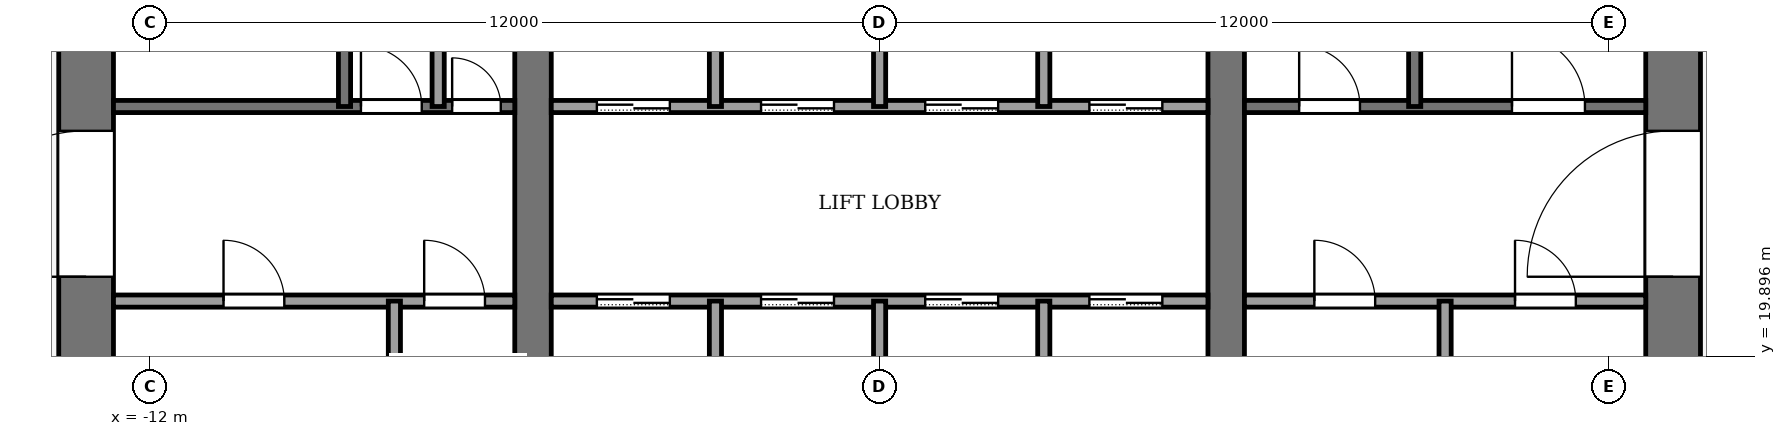
"""IFC4 building model, lengths in metres.
Left out: names, types, materials, properties, quantities, classifications, styles, units other than length and angle.
Written with IfcOpenShell. Run it as: python <this file> out.ifc"""

import sys

from ifc_helpers import new_model, si_unit, direction, frame, frame_2d, origin, place, context, subcontext, project, spatial, rectangle, extrude, element, fill, save


model = new_model("IFC4")
c1 = context("Model", 3, precision=1e-05, world=origin(), true_north=direction((0.0, 1.0)))
c2 = subcontext(c1, "Body", "Model", "MODEL_VIEW")
j1 = project(units=[si_unit("LENGTHUNIT", "METRE"), si_unit("PLANEANGLEUNIT", "RADIAN")], contexts=[c1])
p1 = place(None, origin())
s1 = spatial("IfcSite", under=j1, at=p1, CompositionType="ELEMENT")
p2 = place(p1, origin())
s2 = spatial("IfcBuilding", under=s1, at=p2, CompositionType="ELEMENT")
p3 = place(p2, frame((0.0, 0.0, 190.0)))
s3 = spatial("IfcBuildingStorey", under=s2, at=p3, CompositionType="ELEMENT", Elevation=190.0)
p4 = place(p3, frame((-13.05, 18.4, -0.13), z_axis=(0.0, 0.0, 1.0), x_axis=(0.0, 1.0, 0.0)))
e1 = element("IfcWall", 1, at=p4, inside=s3, PredefinedType="SHEAR", context=c2, shape_type="SweptSolid", body=[
    extrude(rectangle(XDim=19.2, YDim=0.9, at=frame_2d((9.6, 0.0))), origin(), (0.0, 0.0, 1.0), 4.0),
])
p5 = place(p4, frame((2.8, 0.0, 0.13)))
e2 = element("IfcOpeningElement", 2, at=p5, cuts=e1, PredefinedType="OPENING", context=c2, shape_type="SweptSolid", body=[
    extrude(rectangle(XDim=2.4, YDim=2.4, at=frame_2d((1.2, 1.2))), frame((0.0, 0.46, 0.0), z_axis=(0.0, -1.0, 0.0), x_axis=(1.0, 0.0, 0.0)), (0.0, 0.0, 1.0), 0.92),
])
p6 = place(p4, frame((13.4, 0.0, 0.13)))
e3 = element("IfcOpeningElement", 3, at=p6, cuts=e1, PredefinedType="OPENING", context=c2, shape_type="SweptSolid", body=[
    extrude(rectangle(XDim=1.4, YDim=2.2, at=frame_2d((0.7, 1.1))), frame((0.0, 0.46, 0.0), z_axis=(0.0, -1.0, 0.0), x_axis=(1.0, 0.0, 0.0)), (0.0, 0.0, 1.0), 0.92),
])
p7 = place(p3, frame((13.05, 18.4, -0.13), z_axis=(0.0, 0.0, 1.0), x_axis=(0.0, 1.0, 0.0)))
e4 = element("IfcWall", 4, at=p7, inside=s3, PredefinedType="SHEAR", context=c2, shape_type="SweptSolid", body=[
    extrude(rectangle(XDim=19.2, YDim=0.9, at=frame_2d((9.6, 0.0))), origin(), (0.0, 0.0, 1.0), 4.0),
])
p8 = place(p7, frame((2.8, 0.0, 0.13)))
e5 = element("IfcOpeningElement", 5, at=p8, cuts=e4, PredefinedType="OPENING", context=c2, shape_type="SweptSolid", body=[
    extrude(rectangle(XDim=2.4, YDim=2.4, at=frame_2d((1.2, 1.2))), frame((0.0, 0.46, 0.0), z_axis=(0.0, -1.0, 0.0), x_axis=(1.0, 0.0, 0.0)), (0.0, 0.0, 1.0), 0.92),
])
p9 = place(p7, frame((13.3, 0.0, 0.13)))
e6 = element("IfcOpeningElement", 6, at=p9, cuts=e4, PredefinedType="OPENING", context=c2, shape_type="SweptSolid", body=[
    extrude(rectangle(XDim=2.4, YDim=2.4, at=frame_2d((1.2, 1.2))), frame((0.0, 0.46, 0.0), z_axis=(0.0, -1.0, 0.0), x_axis=(1.0, 0.0, 0.0)), (0.0, 0.0, 1.0), 0.92),
])
p10 = place(p3, frame((-5.7, 18.4, -0.13), z_axis=(0.0, 0.0, 1.0), x_axis=(0.0, 1.0, 0.0)))
e7 = element("IfcWall", 7, at=p10, inside=s3, PredefinedType="SHEAR", context=c2, shape_type="SweptSolid", body=[
    extrude(rectangle(XDim=19.2, YDim=0.6, at=frame_2d((9.6, 0.0))), origin(), (0.0, 0.0, 1.0), 4.0),
])
p11 = place(p10, frame((8.35, 0.0, 0.13)))
e8 = element("IfcOpeningElement", 8, at=p11, cuts=e7, PredefinedType="OPENING", context=c2, shape_type="SweptSolid", body=[
    extrude(rectangle(XDim=0.9, YDim=2.1, at=frame_2d((0.45, 1.05))), frame((0.0, 0.31, 0.0), z_axis=(0.0, -1.0, 0.0), x_axis=(1.0, 0.0, 0.0)), (0.0, 0.0, 1.0), 0.62),
])
p12 = place(p3, frame((5.7, 18.4, -0.13), z_axis=(0.0, 0.0, 1.0), x_axis=(0.0, 1.0, 0.0)))
e9 = element("IfcWall", 9, at=p12, inside=s3, PredefinedType="SHEAR", context=c2, shape_type="SweptSolid", body=[
    extrude(rectangle(XDim=19.2, YDim=0.6, at=frame_2d((9.6, 0.0))), origin(), (0.0, 0.0, 1.0), 4.0),
])
p13 = place(p12, frame((8.35, 0.0, 0.13)))
e10 = element("IfcOpeningElement", 10, at=p13, cuts=e9, PredefinedType="OPENING", context=c2, shape_type="SweptSolid", body=[
    extrude(rectangle(XDim=0.9, YDim=2.1, at=frame_2d((0.45, 1.05))), frame((0.0, 0.31, 0.0), z_axis=(0.0, -1.0, 0.0), x_axis=(1.0, 0.0, 0.0)), (0.0, 0.0, 1.0), 0.62),
])
p14 = place(p12, frame((13.3, 0.0, 0.13)))
e11 = element("IfcOpeningElement", 11, at=p14, cuts=e9, PredefinedType="OPENING", context=c2, shape_type="SweptSolid", body=[
    extrude(rectangle(XDim=2.4, YDim=2.4, at=frame_2d((1.2, 1.2))), frame((0.0, 0.31, 0.0), z_axis=(0.0, -1.0, 0.0), x_axis=(1.0, 0.0, 0.0)), (0.0, 0.0, 1.0), 0.62),
])
p15 = place(p3, frame((-12.6, 20.8, 0.0), z_axis=(0.0, 0.0, 1.0), x_axis=(1.0, 0.0, 0.0)))
e12 = element("IfcWall", 12, at=p15, inside=s3, PredefinedType="PARTITIONING", context=c2, shape_type="SweptSolid", body=[
    extrude(rectangle(XDim=6.6, YDim=0.2, at=frame_2d((3.3, 0.0))), origin(), (0.0, 0.0, 1.0), 3.87),
])
p16 = place(p15, frame((1.81, 0.0, 0.0)))
e13 = element("IfcOpeningElement", 13, at=p16, cuts=e12, PredefinedType="OPENING", context=c2, shape_type="SweptSolid", body=[
    extrude(rectangle(XDim=1.0, YDim=2.1, at=frame_2d((0.5, 1.05))), frame((0.0, 0.11, 0.0), z_axis=(0.0, -1.0, 0.0), x_axis=(1.0, 0.0, 0.0)), (0.0, 0.0, 1.0), 0.22),
])
p17 = place(p15, frame((5.11, 0.0, 0.0)))
e14 = element("IfcOpeningElement", 14, at=p17, cuts=e12, PredefinedType="OPENING", context=c2, shape_type="SweptSolid", body=[
    extrude(rectangle(XDim=1.0, YDim=2.1, at=frame_2d((0.5, 1.05))), frame((0.0, 0.11, 0.0), z_axis=(0.0, -1.0, 0.0), x_axis=(1.0, 0.0, 0.0)), (0.0, 0.0, 1.0), 0.22),
])
p18 = place(p3, frame((-5.4, 20.8, 0.0), z_axis=(0.0, 0.0, 1.0), x_axis=(1.0, 0.0, 0.0)))
e15 = element("IfcWall", 15, at=p18, inside=s3, PredefinedType="PARTITIONING", context=c2, shape_type="SweptSolid", body=[
    extrude(rectangle(XDim=10.8, YDim=0.2, at=frame_2d((5.4, 0.0))), origin(), (0.0, 0.0, 1.0), 3.87),
])
p19 = place(p18, frame((0.75, 0.0, 0.0)))
e16 = element("IfcOpeningElement", 16, at=p19, cuts=e15, PredefinedType="OPENING", context=c2, shape_type="SweptSolid", body=[
    extrude(rectangle(XDim=1.2, YDim=2.2, at=frame_2d((0.6, 1.1))), frame((0.0, 0.11, 0.0), z_axis=(0.0, -1.0, 0.0), x_axis=(1.0, 0.0, 0.0)), (0.0, 0.0, 1.0), 0.22),
])
p20 = place(p18, frame((3.45, 0.0, 0.0)))
e17 = element("IfcOpeningElement", 17, at=p20, cuts=e15, PredefinedType="OPENING", context=c2, shape_type="SweptSolid", body=[
    extrude(rectangle(XDim=1.2, YDim=2.2, at=frame_2d((0.6, 1.1))), frame((0.0, 0.11, 0.0), z_axis=(0.0, -1.0, 0.0), x_axis=(1.0, 0.0, 0.0)), (0.0, 0.0, 1.0), 0.22),
])
p21 = place(p18, frame((6.15, 0.0, 0.0)))
e18 = element("IfcOpeningElement", 18, at=p21, cuts=e15, PredefinedType="OPENING", context=c2, shape_type="SweptSolid", body=[
    extrude(rectangle(XDim=1.2, YDim=2.2, at=frame_2d((0.6, 1.1))), frame((0.0, 0.11, 0.0), z_axis=(0.0, -1.0, 0.0), x_axis=(1.0, 0.0, 0.0)), (0.0, 0.0, 1.0), 0.22),
])
p22 = place(p18, frame((8.85, 0.0, 0.0)))
e19 = element("IfcOpeningElement", 19, at=p22, cuts=e15, PredefinedType="OPENING", context=c2, shape_type="SweptSolid", body=[
    extrude(rectangle(XDim=1.2, YDim=2.2, at=frame_2d((0.6, 1.1))), frame((0.0, 0.11, 0.0), z_axis=(0.0, -1.0, 0.0), x_axis=(1.0, 0.0, 0.0)), (0.0, 0.0, 1.0), 0.22),
])
p23 = place(p3, frame((6.0, 20.8, 0.0), z_axis=(0.0, 0.0, 1.0), x_axis=(1.0, 0.0, 0.0)))
e20 = element("IfcWall", 20, at=p23, inside=s3, PredefinedType="PARTITIONING", context=c2, shape_type="SweptSolid", body=[
    extrude(rectangle(XDim=6.6, YDim=0.2, at=frame_2d((3.3, 0.0))), origin(), (0.0, 0.0, 1.0), 3.87),
])
p24 = place(p23, frame((1.15, 0.0, 0.0)))
e21 = element("IfcOpeningElement", 21, at=p24, cuts=e20, PredefinedType="OPENING", context=c2, shape_type="SweptSolid", body=[
    extrude(rectangle(XDim=1.0, YDim=2.1, at=frame_2d((0.5, 1.05))), frame((0.0, 0.11, 0.0), z_axis=(0.0, -1.0, 0.0), x_axis=(1.0, 0.0, 0.0)), (0.0, 0.0, 1.0), 0.22),
])
p25 = place(p23, frame((4.45, 0.0, 0.0)))
e22 = element("IfcOpeningElement", 22, at=p25, cuts=e20, PredefinedType="OPENING", context=c2, shape_type="SweptSolid", body=[
    extrude(rectangle(XDim=1.0, YDim=2.1, at=frame_2d((0.5, 1.05))), frame((0.0, 0.11, 0.0), z_axis=(0.0, -1.0, 0.0), x_axis=(1.0, 0.0, 0.0)), (0.0, 0.0, 1.0), 0.22),
])
p26 = place(p3, frame((-12.6, 24.0, 0.0), z_axis=(0.0, 0.0, 1.0), x_axis=(1.0, 0.0, 0.0)))
e23 = element("IfcWall", 23, at=p26, inside=s3, PredefinedType="PARTITIONING", context=c2, shape_type="SweptSolid", body=[
    extrude(rectangle(XDim=6.6, YDim=0.2, at=frame_2d((3.3, 0.0))), origin(), (0.0, 0.0, 1.0), 3.87),
])
p27 = place(p26, frame((4.07, 0.0, 0.0)))
e24 = element("IfcOpeningElement", 24, at=p27, cuts=e23, PredefinedType="OPENING", context=c2, shape_type="SweptSolid", body=[
    extrude(rectangle(XDim=1.0, YDim=2.1, at=frame_2d((0.5, 1.05))), frame((0.0, 0.11, 0.0), z_axis=(0.0, -1.0, 0.0), x_axis=(1.0, 0.0, 0.0)), (0.0, 0.0, 1.0), 0.22),
])
p28 = place(p26, frame((5.57, 0.0, 0.0)))
e25 = element("IfcOpeningElement", 25, at=p28, cuts=e23, PredefinedType="OPENING", context=c2, shape_type="SweptSolid", body=[
    extrude(rectangle(XDim=0.8, YDim=2.1, at=frame_2d((0.4, 1.05))), frame((0.0, 0.11, 0.0), z_axis=(0.0, -1.0, 0.0), x_axis=(1.0, 0.0, 0.0)), (0.0, 0.0, 1.0), 0.22),
])
p29 = place(p3, frame((-5.4, 24.0, 0.0), z_axis=(0.0, 0.0, 1.0), x_axis=(1.0, 0.0, 0.0)))
e26 = element("IfcWall", 26, at=p29, inside=s3, PredefinedType="PARTITIONING", context=c2, shape_type="SweptSolid", body=[
    extrude(rectangle(XDim=10.8, YDim=0.2, at=frame_2d((5.4, 0.0))), origin(), (0.0, 0.0, 1.0), 3.87),
])
p30 = place(p29, frame((0.75, 0.0, 0.0)))
e27 = element("IfcOpeningElement", 27, at=p30, cuts=e26, PredefinedType="OPENING", context=c2, shape_type="SweptSolid", body=[
    extrude(rectangle(XDim=1.2, YDim=2.2, at=frame_2d((0.6, 1.1))), frame((0.0, 0.11, 0.0), z_axis=(0.0, -1.0, 0.0), x_axis=(1.0, 0.0, 0.0)), (0.0, 0.0, 1.0), 0.22),
])
p31 = place(p29, frame((3.45, 0.0, 0.0)))
e28 = element("IfcOpeningElement", 28, at=p31, cuts=e26, PredefinedType="OPENING", context=c2, shape_type="SweptSolid", body=[
    extrude(rectangle(XDim=1.2, YDim=2.2, at=frame_2d((0.6, 1.1))), frame((0.0, 0.11, 0.0), z_axis=(0.0, -1.0, 0.0), x_axis=(1.0, 0.0, 0.0)), (0.0, 0.0, 1.0), 0.22),
])
p32 = place(p29, frame((6.15, 0.0, 0.0)))
e29 = element("IfcOpeningElement", 29, at=p32, cuts=e26, PredefinedType="OPENING", context=c2, shape_type="SweptSolid", body=[
    extrude(rectangle(XDim=1.2, YDim=2.2, at=frame_2d((0.6, 1.1))), frame((0.0, 0.11, 0.0), z_axis=(0.0, -1.0, 0.0), x_axis=(1.0, 0.0, 0.0)), (0.0, 0.0, 1.0), 0.22),
])
p33 = place(p29, frame((8.85, 0.0, 0.0)))
e30 = element("IfcOpeningElement", 30, at=p33, cuts=e26, PredefinedType="OPENING", context=c2, shape_type="SweptSolid", body=[
    extrude(rectangle(XDim=1.2, YDim=2.2, at=frame_2d((0.6, 1.1))), frame((0.0, 0.11, 0.0), z_axis=(0.0, -1.0, 0.0), x_axis=(1.0, 0.0, 0.0)), (0.0, 0.0, 1.0), 0.22),
])
p34 = place(p3, frame((6.0, 24.0, 0.0), z_axis=(0.0, 0.0, 1.0), x_axis=(1.0, 0.0, 0.0)))
e31 = element("IfcWall", 31, at=p34, inside=s3, PredefinedType="PARTITIONING", context=c2, shape_type="SweptSolid", body=[
    extrude(rectangle(XDim=6.6, YDim=0.2, at=frame_2d((3.3, 0.0))), origin(), (0.0, 0.0, 1.0), 3.87),
])
p35 = place(p34, frame((0.9, 0.0, 0.0)))
e32 = element("IfcOpeningElement", 32, at=p35, cuts=e31, PredefinedType="OPENING", context=c2, shape_type="SweptSolid", body=[
    extrude(rectangle(XDim=1.0, YDim=2.1, at=frame_2d((0.5, 1.05))), frame((0.0, 0.11, 0.0), z_axis=(0.0, -1.0, 0.0), x_axis=(1.0, 0.0, 0.0)), (0.0, 0.0, 1.0), 0.22),
])
p36 = place(p34, frame((4.4, 0.0, 0.0)))
e33 = element("IfcOpeningElement", 33, at=p36, cuts=e31, PredefinedType="OPENING", context=c2, shape_type="SweptSolid", body=[
    extrude(rectangle(XDim=1.2, YDim=2.2, at=frame_2d((0.6, 1.1))), frame((0.0, 0.11, 0.0), z_axis=(0.0, -1.0, 0.0), x_axis=(1.0, 0.0, 0.0)), (0.0, 0.0, 1.0), 0.22),
])
p37 = place(p3, frame((-8.8, 24.0, 0.0), z_axis=(0.0, 0.0, 1.0), x_axis=(0.0, 1.0, 0.0)))
e34 = element("IfcWall", 34, at=p37, inside=s3, PredefinedType="PARTITIONING", context=c2, shape_type="SweptSolid", body=[
    extrude(rectangle(XDim=7.4, YDim=0.2, at=frame_2d((3.7, 0.0))), origin(), (0.0, 0.0, 1.0), 3.87),
])
p38 = place(p3, frame((-7.98, 18.4, 0.0), z_axis=(0.0, 0.0, 1.0), x_axis=(0.0, 1.0, 0.0)))
e35 = element("IfcWall", 35, at=p38, inside=s3, PredefinedType="PARTITIONING", context=c2, shape_type="SweptSolid", body=[
    extrude(rectangle(XDim=2.4, YDim=0.2, at=frame_2d((1.2, 0.0))), origin(), (0.0, 0.0, 1.0), 3.87),
])
p39 = place(p3, frame((-7.26, 24.0, 0.0), z_axis=(0.0, 0.0, 1.0), x_axis=(0.0, 1.0, 0.0)))
e36 = element("IfcWall", 36, at=p39, inside=s3, PredefinedType="PARTITIONING", context=c2, shape_type="SweptSolid", body=[
    extrude(rectangle(XDim=7.4, YDim=0.2, at=frame_2d((3.7, 0.0))), origin(), (0.0, 0.0, 1.0), 3.87),
])
p40 = place(p3, frame((-2.7, 18.4, 0.0), z_axis=(0.0, 0.0, 1.0), x_axis=(0.0, 1.0, 0.0)))
e37 = element("IfcWall", 37, at=p40, inside=s3, PredefinedType="PARTITIONING", context=c2, shape_type="SweptSolid", body=[
    extrude(rectangle(XDim=2.4, YDim=0.2, at=frame_2d((1.2, 0.0))), origin(), (0.0, 0.0, 1.0), 3.87),
])
p41 = place(p3, frame((-2.7, 24.0, 0.0), z_axis=(0.0, 0.0, 1.0), x_axis=(0.0, 1.0, 0.0)))
e38 = element("IfcWall", 38, at=p41, inside=s3, PredefinedType="PARTITIONING", context=c2, shape_type="SweptSolid", body=[
    extrude(rectangle(XDim=2.4, YDim=0.2, at=frame_2d((1.2, 0.0))), origin(), (0.0, 0.0, 1.0), 3.87),
])
p42 = place(p3, frame((0.0, 18.4, 0.0), z_axis=(0.0, 0.0, 1.0), x_axis=(0.0, 1.0, 0.0)))
e39 = element("IfcWall", 39, at=p42, inside=s3, PredefinedType="PARTITIONING", context=c2, shape_type="SweptSolid", body=[
    extrude(rectangle(XDim=2.4, YDim=0.2, at=frame_2d((1.2, 0.0))), origin(), (0.0, 0.0, 1.0), 3.87),
])
p43 = place(p3, frame((0.0, 24.0, 0.0), z_axis=(0.0, 0.0, 1.0), x_axis=(0.0, 1.0, 0.0)))
e40 = element("IfcWall", 40, at=p43, inside=s3, PredefinedType="PARTITIONING", context=c2, shape_type="SweptSolid", body=[
    extrude(rectangle(XDim=4.0, YDim=0.2, at=frame_2d((2.0, 0.0))), origin(), (0.0, 0.0, 1.0), 3.87),
])
p44 = place(p3, frame((2.7, 18.4, 0.0), z_axis=(0.0, 0.0, 1.0), x_axis=(0.0, 1.0, 0.0)))
e41 = element("IfcWall", 41, at=p44, inside=s3, PredefinedType="PARTITIONING", context=c2, shape_type="SweptSolid", body=[
    extrude(rectangle(XDim=2.4, YDim=0.2, at=frame_2d((1.2, 0.0))), origin(), (0.0, 0.0, 1.0), 3.87),
])
p45 = place(p3, frame((2.7, 24.0, 0.0), z_axis=(0.0, 0.0, 1.0), x_axis=(0.0, 1.0, 0.0)))
e42 = element("IfcWall", 42, at=p45, inside=s3, PredefinedType="PARTITIONING", context=c2, shape_type="SweptSolid", body=[
    extrude(rectangle(XDim=2.4, YDim=0.2, at=frame_2d((1.2, 0.0))), origin(), (0.0, 0.0, 1.0), 3.87),
])
p46 = place(p3, frame((8.8, 24.0, 0.0), z_axis=(0.0, 0.0, 1.0), x_axis=(0.0, 1.0, 0.0)))
e43 = element("IfcWall", 43, at=p46, inside=s3, PredefinedType="PARTITIONING", context=c2, shape_type="SweptSolid", body=[
    extrude(rectangle(XDim=7.4, YDim=0.2, at=frame_2d((3.7, 0.0))), origin(), (0.0, 0.0, 1.0), 3.87),
])
p47 = place(p3, frame((9.3, 18.4, 0.0), z_axis=(0.0, 0.0, 1.0), x_axis=(0.0, 1.0, 0.0)))
e44 = element("IfcWall", 44, at=p47, inside=s3, PredefinedType="PARTITIONING", context=c2, shape_type="SweptSolid", body=[
    extrude(rectangle(XDim=2.4, YDim=0.2, at=frame_2d((1.2, 0.0))), origin(), (0.0, 0.0, 1.0), 3.87),
])
p48 = place(p19, origin())
e45 = element("IfcDoor", 45, at=p48, inside=s3, OperationType="SLIDING_TO_LEFT", PredefinedType="DOOR", context=c2, shape_type="SweptSolid", body=[
    extrude(rectangle(XDim=1.2, YDim=2.2, at=frame_2d((0.6, 1.1))), frame((0.0, 0.025, 0.0), z_axis=(0.0, -1.0, 0.0), x_axis=(1.0, 0.0, 0.0)), (0.0, 0.0, 1.0), 0.05),
])
fill(e16, e45)
p49 = place(p20, origin())
e46 = element("IfcDoor", 46, at=p49, inside=s3, OperationType="SLIDING_TO_LEFT", PredefinedType="DOOR", context=c2, shape_type="SweptSolid", body=[
    extrude(rectangle(XDim=1.2, YDim=2.2, at=frame_2d((0.6, 1.1))), frame((0.0, 0.025, 0.0), z_axis=(0.0, -1.0, 0.0), x_axis=(1.0, 0.0, 0.0)), (0.0, 0.0, 1.0), 0.05),
])
fill(e17, e46)
p50 = place(p21, origin())
e47 = element("IfcDoor", 47, at=p50, inside=s3, OperationType="SLIDING_TO_LEFT", PredefinedType="DOOR", context=c2, shape_type="SweptSolid", body=[
    extrude(rectangle(XDim=1.2, YDim=2.2, at=frame_2d((0.6, 1.1))), frame((0.0, 0.025, 0.0), z_axis=(0.0, -1.0, 0.0), x_axis=(1.0, 0.0, 0.0)), (0.0, 0.0, 1.0), 0.05),
])
fill(e18, e47)
p51 = place(p22, origin())
e48 = element("IfcDoor", 48, at=p51, inside=s3, OperationType="SLIDING_TO_LEFT", PredefinedType="DOOR", context=c2, shape_type="SweptSolid", body=[
    extrude(rectangle(XDim=1.2, YDim=2.2, at=frame_2d((0.6, 1.1))), frame((0.0, 0.025, 0.0), z_axis=(0.0, -1.0, 0.0), x_axis=(1.0, 0.0, 0.0)), (0.0, 0.0, 1.0), 0.05),
])
fill(e19, e48)
p52 = place(p30, origin())
e49 = element("IfcDoor", 49, at=p52, inside=s3, OperationType="SLIDING_TO_LEFT", PredefinedType="DOOR", context=c2, shape_type="SweptSolid", body=[
    extrude(rectangle(XDim=1.2, YDim=2.2, at=frame_2d((0.6, 1.1))), frame((0.0, 0.025, 0.0), z_axis=(0.0, -1.0, 0.0), x_axis=(1.0, 0.0, 0.0)), (0.0, 0.0, 1.0), 0.05),
])
fill(e27, e49)
p53 = place(p31, origin())
e50 = element("IfcDoor", 50, at=p53, inside=s3, OperationType="SLIDING_TO_LEFT", PredefinedType="DOOR", context=c2, shape_type="SweptSolid", body=[
    extrude(rectangle(XDim=1.2, YDim=2.2, at=frame_2d((0.6, 1.1))), frame((0.0, 0.025, 0.0), z_axis=(0.0, -1.0, 0.0), x_axis=(1.0, 0.0, 0.0)), (0.0, 0.0, 1.0), 0.05),
])
fill(e28, e50)
p54 = place(p32, origin())
e51 = element("IfcDoor", 51, at=p54, inside=s3, OperationType="SLIDING_TO_LEFT", PredefinedType="DOOR", context=c2, shape_type="SweptSolid", body=[
    extrude(rectangle(XDim=1.2, YDim=2.2, at=frame_2d((0.6, 1.1))), frame((0.0, 0.025, 0.0), z_axis=(0.0, -1.0, 0.0), x_axis=(1.0, 0.0, 0.0)), (0.0, 0.0, 1.0), 0.05),
])
fill(e29, e51)
p55 = place(p33, origin())
e52 = element("IfcDoor", 52, at=p55, inside=s3, OperationType="SLIDING_TO_LEFT", PredefinedType="DOOR", context=c2, shape_type="SweptSolid", body=[
    extrude(rectangle(XDim=1.2, YDim=2.2, at=frame_2d((0.6, 1.1))), frame((0.0, 0.025, 0.0), z_axis=(0.0, -1.0, 0.0), x_axis=(1.0, 0.0, 0.0)), (0.0, 0.0, 1.0), 0.05),
])
fill(e30, e52)
p56 = place(p16, origin())
e53 = element("IfcDoor", 53, at=p56, inside=s3, OperationType="SINGLE_SWING_LEFT", PredefinedType="DOOR", context=c2, shape_type="SweptSolid", body=[
    extrude(rectangle(XDim=1.0, YDim=2.1, at=frame_2d((0.5, 1.05))), frame((0.0, 0.025, 0.0), z_axis=(0.0, -1.0, 0.0), x_axis=(1.0, 0.0, 0.0)), (0.0, 0.0, 1.0), 0.05),
])
fill(e13, e53)
p57 = place(p17, origin())
e54 = element("IfcDoor", 54, at=p57, inside=s3, OperationType="SINGLE_SWING_LEFT", PredefinedType="DOOR", context=c2, shape_type="SweptSolid", body=[
    extrude(rectangle(XDim=1.0, YDim=2.1, at=frame_2d((0.5, 1.05))), frame((0.0, 0.025, 0.0), z_axis=(0.0, -1.0, 0.0), x_axis=(1.0, 0.0, 0.0)), (0.0, 0.0, 1.0), 0.05),
])
fill(e14, e54)
p58 = place(p24, origin())
e55 = element("IfcDoor", 55, at=p58, inside=s3, OperationType="SINGLE_SWING_LEFT", PredefinedType="DOOR", context=c2, shape_type="SweptSolid", body=[
    extrude(rectangle(XDim=1.0, YDim=2.1, at=frame_2d((0.5, 1.05))), frame((0.0, 0.025, 0.0), z_axis=(0.0, -1.0, 0.0), x_axis=(1.0, 0.0, 0.0)), (0.0, 0.0, 1.0), 0.05),
])
fill(e21, e55)
p59 = place(p25, origin())
e56 = element("IfcDoor", 56, at=p59, inside=s3, OperationType="SINGLE_SWING_LEFT", PredefinedType="DOOR", context=c2, shape_type="SweptSolid", body=[
    extrude(rectangle(XDim=1.0, YDim=2.1, at=frame_2d((0.5, 1.05))), frame((0.0, 0.025, 0.0), z_axis=(0.0, -1.0, 0.0), x_axis=(1.0, 0.0, 0.0)), (0.0, 0.0, 1.0), 0.05),
])
fill(e22, e56)
p60 = place(p27, origin())
e57 = element("IfcDoor", 57, at=p60, inside=s3, OperationType="SINGLE_SWING_RIGHT", PredefinedType="DOOR", context=c2, shape_type="SweptSolid", body=[
    extrude(rectangle(XDim=1.0, YDim=2.1, at=frame_2d((0.5, 1.05))), frame((0.0, 0.025, 0.0), z_axis=(0.0, -1.0, 0.0), x_axis=(1.0, 0.0, 0.0)), (0.0, 0.0, 1.0), 0.05),
])
fill(e24, e57)
p61 = place(p28, origin())
e58 = element("IfcDoor", 58, at=p61, inside=s3, OperationType="SINGLE_SWING_LEFT", PredefinedType="DOOR", context=c2, shape_type="SweptSolid", body=[
    extrude(rectangle(XDim=0.8, YDim=2.1, at=frame_2d((0.4, 1.05))), frame((0.0, 0.025, 0.0), z_axis=(0.0, -1.0, 0.0), x_axis=(1.0, 0.0, 0.0)), (0.0, 0.0, 1.0), 0.05),
])
fill(e25, e58)
p62 = place(p35, origin())
e59 = element("IfcDoor", 59, at=p62, inside=s3, OperationType="SINGLE_SWING_RIGHT", PredefinedType="DOOR", context=c2, shape_type="SweptSolid", body=[
    extrude(rectangle(XDim=1.0, YDim=2.1, at=frame_2d((0.5, 1.05))), frame((0.0, 0.025, 0.0), z_axis=(0.0, -1.0, 0.0), x_axis=(1.0, 0.0, 0.0)), (0.0, 0.0, 1.0), 0.05),
])
fill(e32, e59)
p63 = place(p36, origin())
e60 = element("IfcDoor", 60, at=p63, inside=s3, OperationType="SINGLE_SWING_LEFT", PredefinedType="DOOR", context=c2, shape_type="SweptSolid", body=[
    extrude(rectangle(XDim=1.2, YDim=2.2, at=frame_2d((0.6, 1.1))), frame((0.0, 0.025, 0.0), z_axis=(0.0, -1.0, 0.0), x_axis=(1.0, 0.0, 0.0)), (0.0, 0.0, 1.0), 0.05),
])
fill(e33, e60)
p64 = place(p5, origin())
e61 = element("IfcDoor", 61, at=p64, inside=s3, OperationType="DOUBLE_DOOR_SINGLE_SWING", PredefinedType="DOOR", context=c2, shape_type="SweptSolid", body=[
    extrude(rectangle(XDim=2.4, YDim=2.4, at=frame_2d((1.2, 1.2))), frame((0.0, 0.025, 0.0), z_axis=(0.0, -1.0, 0.0), x_axis=(1.0, 0.0, 0.0)), (0.0, 0.0, 1.0), 0.05),
])
fill(e2, e61)
p65 = place(p8, origin())
e62 = element("IfcDoor", 62, at=p65, inside=s3, OperationType="DOUBLE_DOOR_SINGLE_SWING", PredefinedType="DOOR", context=c2, shape_type="SweptSolid", body=[
    extrude(rectangle(XDim=2.4, YDim=2.4, at=frame_2d((1.2, 1.2))), frame((0.0, 0.025, 0.0), z_axis=(0.0, -1.0, 0.0), x_axis=(1.0, 0.0, 0.0)), (0.0, 0.0, 1.0), 0.05),
])
fill(e5, e62)
save(model, sys.argv[1])
